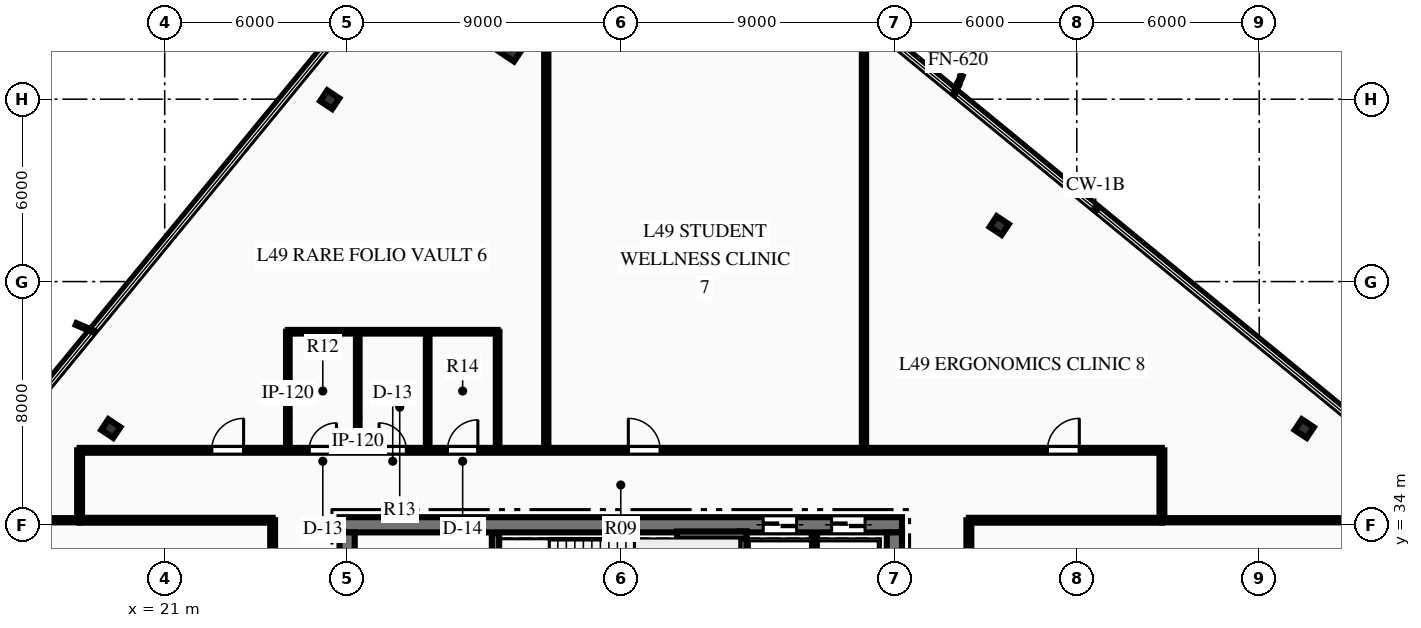
"""IFC4 building model, lengths in metres.
Left out: names, types, materials, properties, quantities, classifications, styles, units other than length and angle.
Written with IfcOpenShell. Run it as: python <this file> out.ifc"""

import sys

from ifc_helpers import new_model, si_unit, direction, frame, frame_2d, origin, origin_2d, place, context, subcontext, project, spatial, rectangle, hollow_rectangle, i_section, extrude, element, fill, save


model = new_model("IFC4")
c1 = context("Model", 3, precision=1e-05, world=origin(), true_north=direction((0.0, 1.0)))
c2 = subcontext(c1, "Body", "Model", "MODEL_VIEW")
j1 = project(units=[si_unit("LENGTHUNIT", "METRE"), si_unit("PLANEANGLEUNIT", "RADIAN")], contexts=[c1])
p1 = place(None, origin())
s1 = spatial("IfcSite", under=j1, at=p1, CompositionType="ELEMENT")
p2 = place(p1, origin())
s2 = spatial("IfcBuilding", under=s1, at=p2, CompositionType="ELEMENT")
p3 = place(p2, frame((0.0, 0.0, 198.45)))
s3 = spatial("IfcBuildingStorey", under=s2, at=p3, CompositionType="ELEMENT", Elevation=198.45)
p4 = place(p3, frame((26.75, 34.0, 0.0), z_axis=(0.0, 0.0, 1.0), x_axis=(1.0, 0.0, 0.0)))
e1 = element("IfcWall", 1, at=p4, inside=s3, PredefinedType="SHEAR", context=c2, shape_type="SweptSolid", body=[
    extrude(rectangle(XDim=18.5, YDim=0.5, at=frame_2d((9.25, 0.0))), origin(), (0.0, 0.0, 1.0), 3.75),
])
p5 = place(p4, frame((13.935, 0.0, 0.0)))
e2 = element("IfcOpeningElement", 2, at=p5, cuts=e1, PredefinedType="OPENING", context=c2, shape_type="SweptSolid", body=[
    extrude(rectangle(XDim=1.1, YDim=2.15, at=frame_2d((0.55, 1.075))), frame((0.0, 0.26, 0.0), z_axis=(0.0, -1.0, 0.0), x_axis=(1.0, 0.0, 0.0)), (0.0, 0.0, 1.0), 0.52),
])
p6 = place(p4, frame((16.185, 0.0, 0.0)))
e3 = element("IfcOpeningElement", 3, at=p6, cuts=e1, PredefinedType="OPENING", context=c2, shape_type="SweptSolid", body=[
    extrude(rectangle(XDim=1.1, YDim=2.15, at=frame_2d((0.55, 1.075))), frame((0.0, 0.26, 0.0), z_axis=(0.0, -1.0, 0.0), x_axis=(1.0, 0.0, 0.0)), (0.0, 0.0, 1.0), 0.52),
])
p7 = place(p3, frame((27.0, 18.25, 0.0), z_axis=(0.0, 0.0, 1.0), x_axis=(0.0, 1.0, 0.0)))
e4 = element("IfcWall", 4, at=p7, inside=s3, PredefinedType="SHEAR", context=c2, shape_type="SweptSolid", body=[
    extrude(rectangle(XDim=15.5, YDim=0.5, at=frame_2d((7.75, 0.0))), origin(), (0.0, 0.0, 1.0), 3.75),
])
p8 = place(p7, frame((9.99, 0.0, 0.0)))
e5 = element("IfcOpeningElement", 5, at=p8, cuts=e4, PredefinedType="OPENING", context=c2, shape_type="SweptSolid", body=[
    extrude(rectangle(XDim=1.4, YDim=2.2, at=frame_2d((0.7, 1.1))), frame((0.0, 0.26, 0.0), z_axis=(0.0, -1.0, 0.0), x_axis=(1.0, 0.0, 0.0)), (0.0, 0.0, 1.0), 0.52),
])
p9 = place(p3, frame((45.0, 18.25, 0.0), z_axis=(0.0, 0.0, 1.0), x_axis=(0.0, 1.0, 0.0)))
e6 = element("IfcWall", 6, at=p9, inside=s3, PredefinedType="SHEAR", context=c2, shape_type="SweptSolid", body=[
    extrude(rectangle(XDim=15.5, YDim=0.5, at=frame_2d((7.75, 0.0))), origin(), (0.0, 0.0, 1.0), 3.75),
])
p10 = place(p9, frame((9.99, 0.0, 0.0)))
e7 = element("IfcOpeningElement", 7, at=p10, cuts=e6, PredefinedType="OPENING", context=c2, shape_type="SweptSolid", body=[
    extrude(rectangle(XDim=1.4, YDim=2.2, at=frame_2d((0.7, 1.1))), frame((0.0, 0.26, 0.0), z_axis=(0.0, -1.0, 0.0), x_axis=(1.0, 0.0, 0.0)), (0.0, 0.0, 1.0), 0.52),
])
p11 = place(p3, frame((31.88, 29.93, 0.0), z_axis=(0.0, 0.0, 1.0), x_axis=(0.0, 1.0, 0.0)))
e8 = element("IfcWall", 8, at=p11, inside=s3, PredefinedType="SHEAR", context=c2, shape_type="SweptSolid", body=[
    extrude(rectangle(XDim=3.79, YDim=0.24, at=frame_2d((1.895, 0.0))), origin(), (0.0, 0.0, 1.0), 3.75),
])
p12 = place(p3, frame((40.02, 29.93, 0.0), z_axis=(0.0, 0.0, 1.0), x_axis=(0.0, 1.0, 0.0)))
e9 = element("IfcWall", 9, at=p12, inside=s3, PredefinedType="SHEAR", context=c2, shape_type="SweptSolid", body=[
    extrude(rectangle(XDim=3.85, YDim=0.24, at=frame_2d((1.925, 0.0))), origin(), (0.0, 0.0, 1.0), 3.75),
])
p13 = place(p3, frame((37.85, 33.66, 0.0), z_axis=(0.0, 0.0, 1.0), x_axis=(1.0, 0.0, 0.0)))
e10 = element("IfcWall", 10, at=p13, inside=s3, PredefinedType="SHEAR", context=c2, shape_type="SweptSolid", body=[
    extrude(rectangle(XDim=2.29, YDim=0.24, at=frame_2d((1.145, 0.0))), origin(), (0.0, 0.0, 1.0), 3.75),
])
p14 = place(p3, frame((32.308, 50.141, 0.0), z_axis=(0.0, 0.0, 1.0), x_axis=(0.554118199338, 0.832437998389, 0.0)))
e11 = element("IfcColumn", 11, at=p14, inside=s3, PredefinedType="COLUMN", context=c2, shape_type="SweptSolid", body=[
    extrude(hollow_rectangle(XDim=1.3, YDim=1.3, WallThickness=0.06, at=origin_2d()), origin(), (0.0, 0.0, 1.0), 3.75),
])
for number, where, z_axis, x_axis in (
    (12, (58.481, 37.164, 0.0), (0.0, 0.0, 1.0), (0.554, 0.832, 0.0)),
    (13, (48.448, 43.842, 0.0), (0.0, 0.0, 1.0), (0.554, 0.832, 0.0)),
    (14, (26.428, 47.984, 0.0), (0.0, 0.0, 1.0), (0.554, 0.832, 0.0)),
    (15, (19.226, 37.166, 0.0), (0.0, 0.0, 1.0), (0.554, 0.832, 0.0)),
):
    element("IfcColumn", number, at=place(p3, frame(where, z_axis=z_axis, x_axis=x_axis)), inside=s3, PredefinedType="COLUMN", context=c2, shape_type="SweptSolid", body=[
        extrude(i_section(OverallWidth=0.424, OverallDepth=0.474, WebThickness=0.048, FlangeThickness=0.077, at=origin_2d()), origin(), (0.0, 0.0, 1.0), 3.75),
    ])
p15 = place(p3, frame((42.37, 29.9, 0.0), z_axis=(0.0, 0.0, 1.0), x_axis=(0.0, 1.0, 0.0)))
e16 = element("IfcWall", 16, at=p15, inside=s3, PredefinedType="PARTITIONING", context=c2, shape_type="SweptSolid", body=[
    extrude(rectangle(XDim=3.75, YDim=0.18, at=frame_2d((1.875, 0.0))), origin(), (0.0, 0.0, 1.0), 3.47),
])
p16 = place(p3, frame((18.2, 36.45, 0.0), z_axis=(0.0, 0.0, 1.0), x_axis=(1.0, 0.0, 0.0)))
e17 = element("IfcWall", 17, at=p16, inside=s3, PredefinedType="PARTITIONING", context=c2, shape_type="SweptSolid", body=[
    extrude(rectangle(XDim=35.6, YDim=0.16, at=frame_2d((17.8, 0.0))), origin(), (0.0, 0.0, 1.0), 2.849),
])
p17 = place(p16, frame((7.55, 0.0, 0.0)))
e18 = element("IfcOpeningElement", 18, at=p17, cuts=e17, PredefinedType="OPENING", context=c2, shape_type="SweptSolid", body=[
    extrude(rectangle(XDim=0.9, YDim=2.15, at=frame_2d((0.45, 1.075))), frame((0.0, 0.09, 0.0), z_axis=(0.0, -1.0, 0.0), x_axis=(1.0, 0.0, 0.0)), (0.0, 0.0, 1.0), 0.18),
])
p18 = place(p16, frame((9.85, 0.0, 0.0)))
e19 = element("IfcOpeningElement", 19, at=p18, cuts=e17, PredefinedType="OPENING", context=c2, shape_type="SweptSolid", body=[
    extrude(rectangle(XDim=0.9, YDim=2.15, at=frame_2d((0.45, 1.075))), frame((0.0, 0.09, 0.0), z_axis=(0.0, -1.0, 0.0), x_axis=(1.0, 0.0, 0.0)), (0.0, 0.0, 1.0), 0.18),
])
p19 = place(p16, frame((12.1, 0.0, 0.0)))
e20 = element("IfcOpeningElement", 20, at=p19, cuts=e17, PredefinedType="OPENING", context=c2, shape_type="SweptSolid", body=[
    extrude(rectangle(XDim=1.0, YDim=2.15, at=frame_2d((0.5, 1.075))), frame((0.0, 0.09, 0.0), z_axis=(0.0, -1.0, 0.0), x_axis=(1.0, 0.0, 0.0)), (0.0, 0.0, 1.0), 0.18),
])
p20 = place(p16, frame((4.345, 0.0, 0.0)))
e21 = element("IfcOpeningElement", 21, at=p20, cuts=e17, PredefinedType="OPENING", context=c2, shape_type="SweptSolid", body=[
    extrude(rectangle(XDim=1.05, YDim=2.15, at=frame_2d((0.525, 1.075))), frame((0.0, 0.09, 0.0), z_axis=(0.0, -1.0, 0.0), x_axis=(1.0, 0.0, 0.0)), (0.0, 0.0, 1.0), 0.18),
])
p21 = place(p16, frame((18.049, 0.0, 0.0)))
e22 = element("IfcOpeningElement", 22, at=p21, cuts=e17, PredefinedType="OPENING", context=c2, shape_type="SweptSolid", body=[
    extrude(rectangle(XDim=1.05, YDim=2.15, at=frame_2d((0.525, 1.075))), frame((0.0, 0.09, 0.0), z_axis=(0.0, -1.0, 0.0), x_axis=(1.0, 0.0, 0.0)), (0.0, 0.0, 1.0), 0.18),
])
p22 = place(p16, frame((31.833, 0.0, 0.0)))
e23 = element("IfcOpeningElement", 23, at=p22, cuts=e17, PredefinedType="OPENING", context=c2, shape_type="SweptSolid", body=[
    extrude(rectangle(XDim=1.05, YDim=2.15, at=frame_2d((0.525, 1.075))), frame((0.0, 0.09, 0.0), z_axis=(0.0, -1.0, 0.0), x_axis=(1.0, 0.0, 0.0)), (0.0, 0.0, 1.0), 0.18),
])
for number, where, z_axis, x_axis in (
    (24, (18.2, 34.15, 0.0), (0.0, 0.0, 1.0), (1.0, 0.0, 0.0)),
    (25, (47.45, 34.15, 0.0), (0.0, 0.0, 1.0), (1.0, 0.0, 0.0)),
):
    element("IfcWall", number, at=place(p3, frame(where, z_axis=z_axis, x_axis=x_axis)), inside=s3, PredefinedType="PARTITIONING", context=c2, shape_type="SweptSolid", body=[
        extrude(rectangle(XDim=6.35, YDim=0.16, at=frame_2d((3.175, 0.0))), origin(), (0.0, 0.0, 1.0), 3.47),
    ])
p23 = place(p3, frame((24.55, 17.85, 0.0), z_axis=(0.0, 0.0, 1.0), x_axis=(0.0, 1.0, 0.0)))
e26 = element("IfcWall", 26, at=p23, inside=s3, PredefinedType="PARTITIONING", context=c2, shape_type="SweptSolid", body=[
    extrude(rectangle(XDim=16.3, YDim=0.16, at=frame_2d((8.15, 0.0))), origin(), (0.0, 0.0, 1.0), 3.47),
])
p24 = place(p23, frame((2.775, 0.0, 0.0)))
e27 = element("IfcOpeningElement", 27, at=p24, cuts=e26, PredefinedType="OPENING", context=c2, shape_type="SweptSolid", body=[
    extrude(rectangle(XDim=0.95, YDim=2.15, at=frame_2d((0.475, 1.075))), frame((0.0, 0.09, 0.0), z_axis=(0.0, -1.0, 0.0), x_axis=(1.0, 0.0, 0.0)), (0.0, 0.0, 1.0), 0.18),
])
p25 = place(p23, frame((8.729, 0.0, 0.0)))
e28 = element("IfcOpeningElement", 28, at=p25, cuts=e26, PredefinedType="OPENING", context=c2, shape_type="SweptSolid", body=[
    extrude(rectangle(XDim=1.05, YDim=2.15, at=frame_2d((0.525, 1.075))), frame((0.0, 0.09, 0.0), z_axis=(0.0, -1.0, 0.0), x_axis=(1.0, 0.0, 0.0)), (0.0, 0.0, 1.0), 0.18),
])
p26 = place(p3, frame((47.45, 27.25, 0.0), z_axis=(0.0, 0.0, 1.0), x_axis=(0.0, 1.0, 0.0)))
e29 = element("IfcWall", 29, at=p26, inside=s3, PredefinedType="PARTITIONING", context=c2, shape_type="SweptSolid", body=[
    extrude(rectangle(XDim=6.9, YDim=0.16, at=frame_2d((3.45, 0.0))), origin(), (0.0, 0.0, 1.0), 3.47),
])
p27 = place(p26, frame((1.683, 0.0, 0.0)))
e30 = element("IfcOpeningElement", 30, at=p27, cuts=e29, PredefinedType="OPENING", context=c2, shape_type="SweptSolid", body=[
    extrude(rectangle(XDim=1.05, YDim=2.15, at=frame_2d((0.525, 1.075))), frame((0.0, 0.09, 0.0), z_axis=(0.0, -1.0, 0.0), x_axis=(1.0, 0.0, 0.0)), (0.0, 0.0, 1.0), 0.18),
])
for number, where, z_axis, x_axis in (
    (31, (18.2, 34.15, 0.0), (0.0, 0.0, 1.0), (0.0, 1.0, 0.0)),
    (32, (53.8, 34.15, 0.0), (0.0, 0.0, 1.0), (0.0, 1.0, 0.0)),
):
    element("IfcWall", number, at=place(p3, frame(where, z_axis=z_axis, x_axis=x_axis)), inside=s3, PredefinedType="PARTITIONING", context=c2, shape_type="SweptSolid", body=[
        extrude(rectangle(XDim=2.3, YDim=0.16, at=frame_2d((1.15, 0.0))), origin(), (0.0, 0.0, 1.0), 3.47),
    ])
for number, where, z_axis, x_axis in (
    (33, (25.05, 36.45, 0.0), (0.0, 0.0, 1.0), (0.0, 1.0, 0.0)),
    (34, (27.35, 36.45, 0.0), (0.0, 0.0, 1.0), (0.0, 1.0, 0.0)),
    (35, (29.65, 36.45, 0.0), (0.0, 0.0, 1.0), (0.0, 1.0, 0.0)),
):
    element("IfcWall", number, at=place(p3, frame(where, z_axis=z_axis, x_axis=x_axis)), inside=s3, PredefinedType="PARTITIONING", context=c2, shape_type="SweptSolid", body=[
        extrude(rectangle(XDim=3.9, YDim=0.12, at=frame_2d((1.95, 0.0))), origin(), (0.0, 0.0, 1.0), 3.47),
    ])
p28 = place(p3, frame((31.95, 36.45, 0.0), z_axis=(0.0, 0.0, 1.0), x_axis=(0.0, 1.0, 0.0)))
e36 = element("IfcWall", 36, at=p28, inside=s3, PredefinedType="PARTITIONING", context=c2, shape_type="SweptSolid", body=[
    extrude(rectangle(XDim=3.9, YDim=0.12, at=frame_2d((1.95, 0.0))), origin(), (0.0, 0.0, 1.0), 2.849),
])
p29 = place(p3, frame((25.05, 40.35, 0.0), z_axis=(0.0, 0.0, 1.0), x_axis=(1.0, 0.0, 0.0)))
e37 = element("IfcWall", 37, at=p29, inside=s3, PredefinedType="PARTITIONING", context=c2, shape_type="SweptSolid", body=[
    extrude(rectangle(XDim=6.9, YDim=0.12, at=frame_2d((3.45, 0.0))), origin(), (0.0, 0.0, 1.0), 3.47),
])
p30 = place(p3, frame((13.37, 34.15, 0.0), z_axis=(0.0, 0.0, 1.0), x_axis=(1.0, 0.0, 0.0)))
e38 = element("IfcWall", 38, at=p30, inside=s3, PredefinedType="PARTITIONING", context=c2, shape_type="SweptSolid", body=[
    extrude(rectangle(XDim=4.83, YDim=0.14, at=frame_2d((2.415, 0.0))), origin(), (0.0, 0.0, 1.0), 3.47),
])
p31 = place(p3, frame((53.8, 34.15, 0.0), z_axis=(0.0, 0.0, 1.0), x_axis=(1.0, 0.0, 0.0)))
e39 = element("IfcWall", 39, at=p31, inside=s3, PredefinedType="PARTITIONING", context=c2, shape_type="SweptSolid", body=[
    extrude(rectangle(XDim=10.499, YDim=0.14, at=frame_2d((5.25, 0.0))), origin(), (0.0, 0.0, 1.0), 3.47),
])
p32 = place(p3, frame((33.55, 36.45, 0.0), z_axis=(0.0, 0.0, 1.0), x_axis=(0.0, 1.0, 0.0)))
e40 = element("IfcWall", 40, at=p32, inside=s3, PredefinedType="PARTITIONING", context=c2, shape_type="SweptSolid", body=[
    extrude(rectangle(XDim=17.911, YDim=0.14, at=frame_2d((8.955, 0.0))), origin(), (0.0, 0.0, 1.0), 3.47),
])
p33 = place(p3, frame((44.0, 36.45, 0.0), z_axis=(0.0, 0.0, 1.0), x_axis=(0.0, 1.0, 0.0)))
e41 = element("IfcWall", 41, at=p33, inside=s3, PredefinedType="PARTITIONING", context=c2, shape_type="SweptSolid", body=[
    extrude(rectangle(XDim=14.374, YDim=0.14, at=frame_2d((7.187, 0.0))), origin(), (0.0, 0.0, 1.0), 3.47),
])
p34 = place(p17, origin())
e42 = element("IfcDoor", 42, at=p34, inside=s3, OperationType="SINGLE_SWING_RIGHT", PredefinedType="DOOR", context=c2, shape_type="SweptSolid", body=[
    extrude(rectangle(XDim=0.9, YDim=2.15, at=frame_2d((0.45, 1.075))), frame((0.0, 0.025, 0.0), z_axis=(0.0, -1.0, 0.0), x_axis=(1.0, 0.0, 0.0)), (0.0, 0.0, 1.0), 0.05),
])
fill(e18, e42)
p35 = place(p18, origin())
e43 = element("IfcDoor", 43, at=p35, inside=s3, OperationType="SINGLE_SWING_LEFT", PredefinedType="DOOR", context=c2, shape_type="SweptSolid", body=[
    extrude(rectangle(XDim=0.9, YDim=2.15, at=frame_2d((0.45, 1.075))), frame((0.0, 0.025, 0.0), z_axis=(0.0, -1.0, 0.0), x_axis=(1.0, 0.0, 0.0)), (0.0, 0.0, 1.0), 0.05),
])
fill(e19, e43)
p36 = place(p19, origin())
e44 = element("IfcDoor", 44, at=p36, inside=s3, OperationType="SINGLE_SWING_RIGHT", PredefinedType="DOOR", context=c2, shape_type="SweptSolid", body=[
    extrude(rectangle(XDim=1.0, YDim=2.15, at=frame_2d((0.5, 1.075))), frame((0.0, 0.025, 0.0), z_axis=(0.0, -1.0, 0.0), x_axis=(1.0, 0.0, 0.0)), (0.0, 0.0, 1.0), 0.05),
])
fill(e20, e44)
p37 = place(p20, origin())
e45 = element("IfcDoor", 45, at=p37, inside=s3, OperationType="SINGLE_SWING_RIGHT", PredefinedType="DOOR", context=c2, shape_type="SweptSolid", body=[
    extrude(rectangle(XDim=1.05, YDim=2.15, at=frame_2d((0.525, 1.075))), frame((0.0, 0.025, 0.0), z_axis=(0.0, -1.0, 0.0), x_axis=(1.0, 0.0, 0.0)), (0.0, 0.0, 1.0), 0.05),
])
fill(e21, e45)
p38 = place(p21, origin())
e46 = element("IfcDoor", 46, at=p38, inside=s3, OperationType="SINGLE_SWING_LEFT", PredefinedType="DOOR", context=c2, shape_type="SweptSolid", body=[
    extrude(rectangle(XDim=1.05, YDim=2.15, at=frame_2d((0.525, 1.075))), frame((0.0, 0.025, 0.0), z_axis=(0.0, -1.0, 0.0), x_axis=(1.0, 0.0, 0.0)), (0.0, 0.0, 1.0), 0.05),
])
fill(e22, e46)
p39 = place(p22, origin())
e47 = element("IfcDoor", 47, at=p39, inside=s3, OperationType="SINGLE_SWING_RIGHT", PredefinedType="DOOR", context=c2, shape_type="SweptSolid", body=[
    extrude(rectangle(XDim=1.05, YDim=2.15, at=frame_2d((0.525, 1.075))), frame((0.0, 0.025, 0.0), z_axis=(0.0, -1.0, 0.0), x_axis=(1.0, 0.0, 0.0)), (0.0, 0.0, 1.0), 0.05),
])
fill(e23, e47)
p40 = place(p5, origin())
e48 = element("IfcDoor", 48, at=p40, inside=s3, OperationType="SLIDING_TO_LEFT", PredefinedType="DOOR", context=c2, shape_type="SweptSolid", body=[
    extrude(rectangle(XDim=1.1, YDim=2.15, at=frame_2d((0.55, 1.075))), frame((0.0, 0.025, 0.0), z_axis=(0.0, -1.0, 0.0), x_axis=(1.0, 0.0, 0.0)), (0.0, 0.0, 1.0), 0.05),
])
fill(e2, e48)
p41 = place(p6, origin())
e49 = element("IfcDoor", 49, at=p41, inside=s3, OperationType="SLIDING_TO_LEFT", PredefinedType="DOOR", context=c2, shape_type="SweptSolid", body=[
    extrude(rectangle(XDim=1.1, YDim=2.15, at=frame_2d((0.55, 1.075))), frame((0.0, 0.025, 0.0), z_axis=(0.0, -1.0, 0.0), x_axis=(1.0, 0.0, 0.0)), (0.0, 0.0, 1.0), 0.05),
])
fill(e3, e49)
save(model, sys.argv[1])
